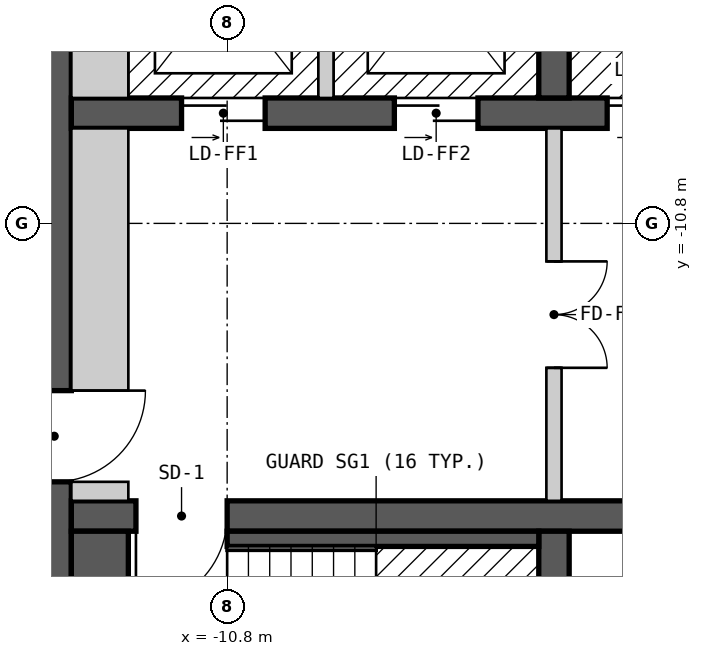
"""IFC4 building model, lengths in metres.
Left out: names, types, materials, properties, quantities, classifications, styles, units other than length and angle.
Written with IfcOpenShell. Run it as: python <this file> out.ifc"""

import sys

from ifc_helpers import new_model, si_unit, direction, frame, frame_2d, origin, place, context, subcontext, project, spatial, rectangle, extrude, element, fill, save


model = new_model("IFC4")
c1 = context("Model", 3, precision=1e-05, world=origin(), true_north=direction((0.0, 1.0)))
c2 = subcontext(c1, "Body", "Model", "MODEL_VIEW")
j1 = project(units=[si_unit("LENGTHUNIT", "METRE"), si_unit("PLANEANGLEUNIT", "RADIAN")], contexts=[c1])
p1 = place(None, origin())
s1 = spatial("IfcSite", under=j1, at=p1, CompositionType="ELEMENT")
p2 = place(p1, origin())
s2 = spatial("IfcBuilding", under=s1, at=p2, CompositionType="ELEMENT")
p3 = place(p2, frame((0.0, 0.0, 217.8)))
s3 = spatial("IfcBuildingStorey", under=s2, at=p3, CompositionType="ELEMENT", Elevation=217.8)
p4 = place(p3, frame((-13.075, -18.55, 0.0), z_axis=(0.0, 0.0, 1.0), x_axis=(0.0, 1.0, 0.0)))
e1 = element("IfcWall", 1, at=p4, inside=s3, PredefinedType="SHEAR", context=c2, shape_type="SweptSolid", body=[
    extrude(rectangle(XDim=13.1, YDim=0.45, at=frame_2d((6.55, 0.0))), origin(), (0.0, 0.0, 1.0), 2.7),
])
p5 = place(p4, frame((4.35, 0.0, 0.0)))
e2 = element("IfcOpeningElement", 2, at=p5, cuts=e1, PredefinedType="OPENING", context=c2, shape_type="SweptSolid", body=[
    extrude(rectangle(XDim=1.2, YDim=2.1, at=frame_2d((0.6, 1.05))), frame((0.0, 0.235, 0.0), z_axis=(0.0, -1.0, 0.0), x_axis=(1.0, 0.0, 0.0)), (0.0, 0.0, 1.0), 0.47),
])
p6 = place(p3, frame((-12.85, -14.65, 0.0), z_axis=(0.0, 0.0, 1.0), x_axis=(1.0, 0.0, 0.0)))
e3 = element("IfcWall", 3, at=p6, inside=s3, PredefinedType="SHEAR", context=c2, shape_type="SweptSolid", body=[
    extrude(rectangle(XDim=25.7, YDim=0.4, at=frame_2d((12.85, 0.0))), origin(), (0.0, 0.0, 1.0), 2.7),
])
p7 = place(p6, frame((2.05, 0.0, 0.0), z_axis=(0.0, 0.0, 1.0), x_axis=(-1.0, 0.0, 0.0)))
e4 = element("IfcOpeningElement", 4, at=p7, cuts=e3, PredefinedType="OPENING", context=c2, shape_type="SweptSolid", body=[
    extrude(rectangle(XDim=1.2, YDim=2.1, at=frame_2d((0.6, 1.05))), frame((0.0, 0.21, 0.0), z_axis=(0.0, -1.0, 0.0), x_axis=(1.0, 0.0, 0.0)), (0.0, 0.0, 1.0), 0.42),
])
p8 = place(p6, frame((24.9, 0.0, 0.0), z_axis=(0.0, 0.0, 1.0), x_axis=(-1.0, 0.0, 0.0)))
e5 = element("IfcOpeningElement", 5, at=p8, cuts=e3, PredefinedType="OPENING", context=c2, shape_type="SweptSolid", body=[
    extrude(rectangle(XDim=1.2, YDim=2.1, at=frame_2d((0.6, 1.05))), frame((0.0, 0.21, 0.0), z_axis=(0.0, -1.0, 0.0), x_axis=(1.0, 0.0, 0.0)), (0.0, 0.0, 1.0), 0.42),
])
p9 = place(p6, frame((8.75, 0.0, 0.0), z_axis=(0.0, 0.0, 1.0), x_axis=(-1.0, 0.0, 0.0)))
e6 = element("IfcOpeningElement", 6, at=p9, cuts=e3, PredefinedType="OPENING", context=c2, shape_type="SweptSolid", body=[
    extrude(rectangle(XDim=1.0, YDim=2.1, at=frame_2d((0.5, 1.05))), frame((0.0, 0.21, 0.0), z_axis=(0.0, -1.0, 0.0), x_axis=(1.0, 0.0, 0.0)), (0.0, 0.0, 1.0), 0.42),
])
p10 = place(p6, frame((11.5, 0.0, 0.0), z_axis=(0.0, 0.0, 1.0), x_axis=(-1.0, 0.0, 0.0)))
e7 = element("IfcOpeningElement", 7, at=p10, cuts=e3, PredefinedType="OPENING", context=c2, shape_type="SweptSolid", body=[
    extrude(rectangle(XDim=0.9, YDim=2.1, at=frame_2d((0.45, 1.05))), frame((0.0, 0.21, 0.0), z_axis=(0.0, -1.0, 0.0), x_axis=(1.0, 0.0, 0.0)), (0.0, 0.0, 1.0), 0.42),
])
p11 = place(p6, frame((14.3, 0.0, 0.0), z_axis=(0.0, 0.0, 1.0), x_axis=(-1.0, 0.0, 0.0)))
e8 = element("IfcOpeningElement", 8, at=p11, cuts=e3, PredefinedType="OPENING", context=c2, shape_type="SweptSolid", body=[
    extrude(rectangle(XDim=1.0, YDim=2.1, at=frame_2d((0.5, 1.05))), frame((0.0, 0.21, 0.0), z_axis=(0.0, -1.0, 0.0), x_axis=(1.0, 0.0, 0.0)), (0.0, 0.0, 1.0), 0.42),
])
p12 = place(p6, frame((17.9, 0.0, 0.0), z_axis=(0.0, 0.0, 1.0), x_axis=(-1.0, 0.0, 0.0)))
e9 = element("IfcOpeningElement", 9, at=p12, cuts=e3, PredefinedType="OPENING", context=c2, shape_type="SweptSolid", body=[
    extrude(rectangle(XDim=1.0, YDim=2.1, at=frame_2d((0.5, 1.05))), frame((0.0, 0.21, 0.0), z_axis=(0.0, -1.0, 0.0), x_axis=(1.0, 0.0, 0.0)), (0.0, 0.0, 1.0), 0.42),
])
p13 = place(p3, frame((-12.85, -9.35, 0.0), z_axis=(0.0, 0.0, 1.0), x_axis=(1.0, 0.0, 0.0)))
e10 = element("IfcWall", 10, at=p13, inside=s3, PredefinedType="SHEAR", context=c2, shape_type="SweptSolid", body=[
    extrude(rectangle(XDim=23.05, YDim=0.4, at=frame_2d((11.525, 0.0))), origin(), (0.0, 0.0, 1.0), 2.7),
])
p14 = place(p13, frame((1.45, 0.0, 0.0)))
e11 = element("IfcOpeningElement", 11, at=p14, cuts=e10, PredefinedType="OPENING", context=c2, shape_type="SweptSolid", body=[
    extrude(rectangle(XDim=1.1, YDim=2.1, at=frame_2d((0.55, 1.05))), frame((0.0, 0.21, 0.0), z_axis=(0.0, -1.0, 0.0), x_axis=(1.0, 0.0, 0.0)), (0.0, 0.0, 1.0), 0.42),
])
p15 = place(p13, frame((4.25, 0.0, 0.0)))
e12 = element("IfcOpeningElement", 12, at=p15, cuts=e10, PredefinedType="OPENING", context=c2, shape_type="SweptSolid", body=[
    extrude(rectangle(XDim=1.1, YDim=2.1, at=frame_2d((0.55, 1.05))), frame((0.0, 0.21, 0.0), z_axis=(0.0, -1.0, 0.0), x_axis=(1.0, 0.0, 0.0)), (0.0, 0.0, 1.0), 0.42),
])
p16 = place(p13, frame((7.05, 0.0, 0.0)))
e13 = element("IfcOpeningElement", 13, at=p16, cuts=e10, PredefinedType="OPENING", context=c2, shape_type="SweptSolid", body=[
    extrude(rectangle(XDim=1.1, YDim=2.1, at=frame_2d((0.55, 1.05))), frame((0.0, 0.21, 0.0), z_axis=(0.0, -1.0, 0.0), x_axis=(1.0, 0.0, 0.0)), (0.0, 0.0, 1.0), 0.42),
])
p17 = place(p13, frame((9.35, 0.0, 0.0)))
e14 = element("IfcOpeningElement", 14, at=p17, cuts=e10, PredefinedType="OPENING", context=c2, shape_type="SweptSolid", body=[
    extrude(rectangle(XDim=1.1, YDim=2.1, at=frame_2d((0.55, 1.05))), frame((0.0, 0.21, 0.0), z_axis=(0.0, -1.0, 0.0), x_axis=(1.0, 0.0, 0.0)), (0.0, 0.0, 1.0), 0.42),
])
p18 = place(p13, frame((11.65, 0.0, 0.0)))
e15 = element("IfcOpeningElement", 15, at=p18, cuts=e10, PredefinedType="OPENING", context=c2, shape_type="SweptSolid", body=[
    extrude(rectangle(XDim=1.1, YDim=2.1, at=frame_2d((0.55, 1.05))), frame((0.0, 0.21, 0.0), z_axis=(0.0, -1.0, 0.0), x_axis=(1.0, 0.0, 0.0)), (0.0, 0.0, 1.0), 0.42),
])
p19 = place(p13, frame((13.95, 0.0, 0.0)))
e16 = element("IfcOpeningElement", 16, at=p19, cuts=e10, PredefinedType="OPENING", context=c2, shape_type="SweptSolid", body=[
    extrude(rectangle(XDim=1.1, YDim=2.1, at=frame_2d((0.55, 1.05))), frame((0.0, 0.21, 0.0), z_axis=(0.0, -1.0, 0.0), x_axis=(1.0, 0.0, 0.0)), (0.0, 0.0, 1.0), 0.42),
])
p20 = place(p13, frame((16.25, 0.0, 0.0)))
e17 = element("IfcOpeningElement", 17, at=p20, cuts=e10, PredefinedType="OPENING", context=c2, shape_type="SweptSolid", body=[
    extrude(rectangle(XDim=1.1, YDim=2.1, at=frame_2d((0.55, 1.05))), frame((0.0, 0.21, 0.0), z_axis=(0.0, -1.0, 0.0), x_axis=(1.0, 0.0, 0.0)), (0.0, 0.0, 1.0), 0.42),
])
p21 = place(p13, frame((18.55, 0.0, 0.0)))
e18 = element("IfcOpeningElement", 18, at=p21, cuts=e10, PredefinedType="OPENING", context=c2, shape_type="SweptSolid", body=[
    extrude(rectangle(XDim=1.1, YDim=2.1, at=frame_2d((0.55, 1.05))), frame((0.0, 0.21, 0.0), z_axis=(0.0, -1.0, 0.0), x_axis=(1.0, 0.0, 0.0)), (0.0, 0.0, 1.0), 0.42),
])
p22 = place(p13, frame((20.95, 0.0, 0.0)))
e19 = element("IfcOpeningElement", 19, at=p22, cuts=e10, PredefinedType="OPENING", context=c2, shape_type="SweptSolid", body=[
    extrude(rectangle(XDim=1.1, YDim=2.1, at=frame_2d((0.55, 1.05))), frame((0.0, 0.21, 0.0), z_axis=(0.0, -1.0, 0.0), x_axis=(1.0, 0.0, 0.0)), (0.0, 0.0, 1.0), 0.42),
])
for number, where, z_axis, x_axis in (
    (20, (-6.5, -18.55, 0.0), (0.0, 0.0, 1.0), (0.0, 1.0, 0.0)),
    (21, (-6.5, -9.15, 0.0), (0.0, 0.0, 1.0), (0.0, 1.0, 0.0)),
):
    element("IfcWall", number, at=place(p3, frame(where, z_axis=z_axis, x_axis=x_axis)), inside=s3, PredefinedType="SHEAR", context=c2, shape_type="SweptSolid", body=[
        extrude(rectangle(XDim=3.7, YDim=0.4, at=frame_2d((1.85, 0.0))), origin(), (0.0, 0.0, 1.0), 2.7),
    ])
p23 = place(p3, frame((-12.475, -18.55, 0.0), z_axis=(0.0, 0.0, 1.0), x_axis=(0.0, 1.0, 0.0)))
e22 = element("IfcWall", 22, at=p23, inside=s3, PredefinedType="SOLIDWALL", context=c2, shape_type="SweptSolid", body=[
    extrude(rectangle(XDim=3.7, YDim=0.75, at=frame_2d((1.85, 0.0))), origin(), (0.0, 0.0, 1.0), 2.7),
])
p24 = place(p3, frame((-12.85, -14.325, 0.0), z_axis=(0.0, 0.0, 1.0), x_axis=(1.0, 0.0, 0.0)))
e23 = element("IfcWall", 23, at=p24, inside=s3, PredefinedType="PARTITIONING", context=c2, shape_type="SweptSolid", body=[
    extrude(rectangle(XDim=0.75, YDim=0.25, at=frame_2d((0.375, 0.0))), origin(), (0.0, 0.0, 1.0), 2.7),
])
p25 = place(p3, frame((-12.475, -13.0, 0.0), z_axis=(0.0, 0.0, 1.0), x_axis=(0.0, 1.0, 0.0)))
e24 = element("IfcWall", 24, at=p25, inside=s3, PredefinedType="PARTITIONING", context=c2, shape_type="SweptSolid", body=[
    extrude(rectangle(XDim=3.45, YDim=0.75, at=frame_2d((1.725, 0.0))), origin(), (0.0, 0.0, 1.0), 2.7),
])
p26 = place(p3, frame((-12.475, -9.15, 0.0), z_axis=(0.0, 0.0, 1.0), x_axis=(0.0, 1.0, 0.0)))
e25 = element("IfcWall", 25, at=p26, inside=s3, PredefinedType="SOLIDWALL", context=c2, shape_type="SweptSolid", body=[
    extrude(rectangle(XDim=3.7, YDim=0.75, at=frame_2d((1.85, 0.0))), origin(), (0.0, 0.0, 1.0), 2.7),
])
p27 = place(p3, frame((-10.8, -14.95, 0.0), z_axis=(0.0, 0.0, 1.0), x_axis=(1.0, 0.0, 0.0)))
e26 = element("IfcWall", 26, at=p27, inside=s3, PredefinedType="SOLIDWALL", context=c2, shape_type="SweptSolid", body=[
    extrude(rectangle(XDim=4.1, YDim=0.2, at=frame_2d((2.05, 0.0))), origin(), (0.0, 0.0, 1.0), 2.7),
])
p28 = place(p3, frame((-9.5, -9.15, 0.0), z_axis=(0.0, 0.0, 1.0), x_axis=(0.0, 1.0, 0.0)))
e27 = element("IfcWall", 27, at=p28, inside=s3, PredefinedType="SOLIDWALL", context=c2, shape_type="SweptSolid", body=[
    extrude(rectangle(XDim=2.95, YDim=0.2, at=frame_2d((1.475, 0.0))), origin(), (0.0, 0.0, 1.0), 2.7),
])
p29 = place(p3, frame((-6.5, -14.45, 0.0), z_axis=(0.0, 0.0, 1.0), x_axis=(0.0, 1.0, 0.0)))
e28 = element("IfcWall", 28, at=p29, inside=s3, PredefinedType="PARTITIONING", context=c2, shape_type="SweptSolid", body=[
    extrude(rectangle(XDim=4.9, YDim=0.2, at=frame_2d((2.45, 0.0))), origin(), (0.0, 0.0, 1.0), 2.7),
])
p30 = place(p29, frame((3.15, 0.0, 0.0), z_axis=(0.0, 0.0, 1.0), x_axis=(-1.0, 0.0, 0.0)))
e29 = element("IfcOpeningElement", 29, at=p30, cuts=e28, PredefinedType="OPENING", context=c2, shape_type="SweptSolid", body=[
    extrude(rectangle(XDim=1.4, YDim=2.1, at=frame_2d((0.7, 1.05))), frame((0.0, 0.11, 0.0), z_axis=(0.0, -1.0, 0.0), x_axis=(1.0, 0.0, 0.0)), (0.0, 0.0, 1.0), 0.22),
])
p31 = place(p14, origin())
e30 = element("IfcDoor", 30, at=p31, inside=s3, OperationType="DOUBLE_DOOR_SLIDING", PredefinedType="DOOR", context=c2, shape_type="SweptSolid", body=[
    extrude(rectangle(XDim=1.1, YDim=2.1, at=frame_2d((0.55, 1.05))), frame((0.0, 0.025, 0.0), z_axis=(0.0, -1.0, 0.0), x_axis=(1.0, 0.0, 0.0)), (0.0, 0.0, 1.0), 0.05),
])
fill(e11, e30)
p32 = place(p15, origin())
e31 = element("IfcDoor", 31, at=p32, inside=s3, OperationType="DOUBLE_DOOR_SLIDING", PredefinedType="DOOR", context=c2, shape_type="SweptSolid", body=[
    extrude(rectangle(XDim=1.1, YDim=2.1, at=frame_2d((0.55, 1.05))), frame((0.0, 0.025, 0.0), z_axis=(0.0, -1.0, 0.0), x_axis=(1.0, 0.0, 0.0)), (0.0, 0.0, 1.0), 0.05),
])
fill(e12, e31)
p33 = place(p16, origin())
e32 = element("IfcDoor", 32, at=p33, inside=s3, OperationType="DOUBLE_DOOR_SLIDING", PredefinedType="DOOR", context=c2, shape_type="SweptSolid", body=[
    extrude(rectangle(XDim=1.1, YDim=2.1, at=frame_2d((0.55, 1.05))), frame((0.0, 0.025, 0.0), z_axis=(0.0, -1.0, 0.0), x_axis=(1.0, 0.0, 0.0)), (0.0, 0.0, 1.0), 0.05),
])
fill(e13, e32)
p34 = place(p7, origin())
e33 = element("IfcDoor", 33, at=p34, inside=s3, OperationType="SINGLE_SWING_RIGHT", PredefinedType="DOOR", context=c2, shape_type="SweptSolid", body=[
    extrude(rectangle(XDim=1.2, YDim=2.1, at=frame_2d((0.6, 1.05))), frame((0.0, 0.025, 0.0), z_axis=(0.0, -1.0, 0.0), x_axis=(1.0, 0.0, 0.0)), (0.0, 0.0, 1.0), 0.05),
])
fill(e4, e33)
p35 = place(p5, origin())
e34 = element("IfcDoor", 34, at=p35, inside=s3, OperationType="SINGLE_SWING_RIGHT", PredefinedType="DOOR", context=c2, shape_type="SweptSolid", body=[
    extrude(rectangle(XDim=1.2, YDim=2.1, at=frame_2d((0.6, 1.05))), frame((0.0, 0.025, 0.0), z_axis=(0.0, -1.0, 0.0), x_axis=(1.0, 0.0, 0.0)), (0.0, 0.0, 1.0), 0.05),
])
fill(e2, e34)
p36 = place(p30, origin())
e35 = element("IfcDoor", 35, at=p36, inside=s3, OperationType="DOUBLE_DOOR_SINGLE_SWING", PredefinedType="DOOR", context=c2, shape_type="SweptSolid", body=[
    extrude(rectangle(XDim=1.4, YDim=2.1, at=frame_2d((0.7, 1.05))), frame((0.0, 0.025, 0.0), z_axis=(0.0, -1.0, 0.0), x_axis=(1.0, 0.0, 0.0)), (0.0, 0.0, 1.0), 0.05),
])
fill(e29, e35)
save(model, sys.argv[1])
